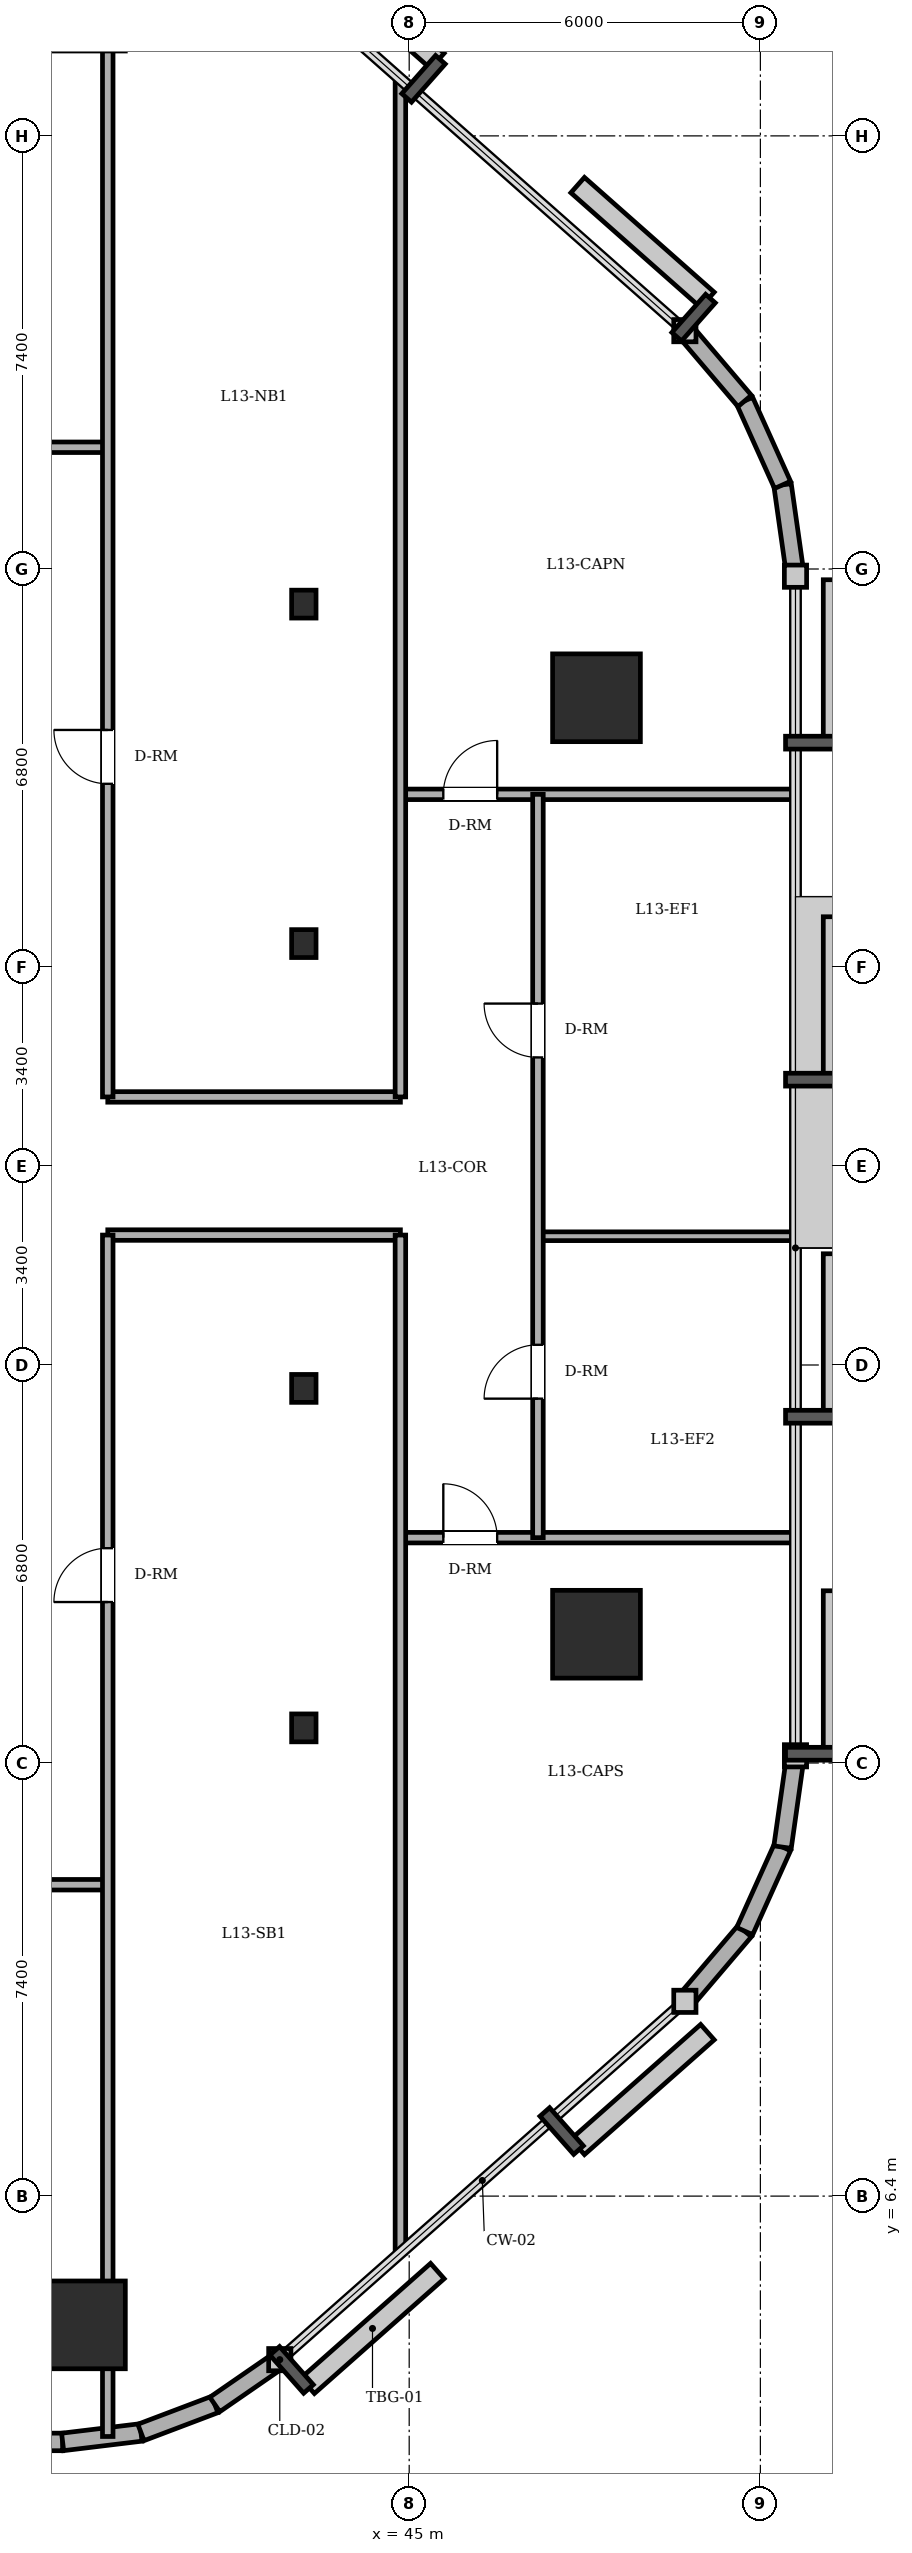
"""IFC4 building model, lengths in metres.
Left out: names, types, materials, properties, quantities, classifications, styles, units other than length and angle.
Written with IfcOpenShell. Run it as: python <this file> out.ifc"""

import sys

from ifc_helpers import new_model, si_unit, direction, frame, frame_2d, origin, origin_2d, place, context, subcontext, project, spatial, rectangle, circle, i_section, extrude, element, fill, save


model = new_model("IFC4")
c1 = context("Model", 3, precision=1e-05, world=origin(), true_north=direction((0.0, 1.0)))
c2 = subcontext(c1, "Body", "Model", "MODEL_VIEW")
j1 = project(units=[si_unit("LENGTHUNIT", "METRE"), si_unit("PLANEANGLEUNIT", "RADIAN")], contexts=[c1])
p1 = place(None, origin())
s1 = spatial("IfcSite", under=j1, at=p1, CompositionType="ELEMENT")
p2 = place(p1, origin())
s2 = spatial("IfcBuilding", under=s1, at=p2, CompositionType="ELEMENT")
p3 = place(p2, frame((0.0, 0.0, 50.4)))
s3 = spatial("IfcBuildingStorey", under=s2, at=p3, CompositionType="ELEMENT", Elevation=50.4)
for number, where, z_axis, x_axis in (
    (1, (39.4, 4.2, 0.0), (0.0, 0.0, 1.0), (1.0, 0.0, 0.0)),
    (2, (48.2, 16.0, 0.0), (0.0, 0.0, 1.0), (1.0, 0.0, 0.0)),
    (3, (48.2, 32.0, 0.0), (0.0, 0.0, 1.0), (1.0, 0.0, 0.0)),
):
    element("IfcColumn", number, at=place(p3, frame(where, z_axis=z_axis, x_axis=x_axis)), inside=s3, PredefinedType="COLUMN", context=c2, shape_type="SweptSolid", body=[
        extrude(circle(Radius=0.75, at=origin_2d()), origin(), (0.0, 0.0, 1.0), 3.6),
    ])
for number, where, z_axis, x_axis in (
    (4, (43.2, 14.4, 0.0), (0.0, 0.0, 1.0), (1.0, 0.0, 0.0)),
    (5, (43.2, 20.2, 0.0), (0.0, 0.0, 1.0), (1.0, 0.0, 0.0)),
    (6, (43.2, 27.8, 0.0), (0.0, 0.0, 1.0), (1.0, 0.0, 0.0)),
    (7, (43.2, 33.6, 0.0), (0.0, 0.0, 1.0), (1.0, 0.0, 0.0)),
):
    element("IfcColumn", number, at=place(p3, frame(where, z_axis=z_axis, x_axis=x_axis)), inside=s3, PredefinedType="COLUMN", context=c2, shape_type="SweptSolid", body=[
        extrude(i_section(OverallWidth=0.417, OverallDepth=0.477, WebThickness=0.036, FlangeThickness=0.057, FilletRadius=0.015, at=origin_2d()), origin(), (0.0, 0.0, 1.0), 3.6),
    ])
p4 = place(p3, frame((9.0, 2.2, 0.0), z_axis=(0.0, 0.0, 1.0), x_axis=(1.0, 0.0, 0.0)))
e8 = element("IfcWall", 8, at=p4, inside=s3, PredefinedType="SOLIDWALL", context=c2, shape_type="SweptSolid", body=[
    extrude(rectangle(XDim=30.079, YDim=0.3, at=frame_2d((15.04, 0.0))), origin(), (0.0, 0.0, 1.0), 3.4),
])
p5 = place(p4, frame((11.225, 0.0, 0.0)))
e9 = element("IfcOpeningElement", 9, at=p5, cuts=e8, PredefinedType="OPENING", context=c2, shape_type="SweptSolid", body=[
    extrude(rectangle(XDim=0.95, YDim=2.2, at=frame_2d((0.475, 1.1))), frame((0.0, 0.16, 0.0), z_axis=(0.0, -1.0, 0.0), x_axis=(1.0, 0.0, 0.0)), (0.0, 0.0, 1.0), 0.32),
])
p6 = place(p4, frame((4.067, 0.0, 0.85)))
e10 = element("IfcOpeningElement", 10, at=p6, cuts=e8, PredefinedType="OPENING", context=c2, shape_type="SweptSolid", body=[
    extrude(rectangle(XDim=1.8, YDim=1.55, at=frame_2d((0.9, 0.775))), frame((0.0, 0.16, 0.0), z_axis=(0.0, -1.0, 0.0), x_axis=(1.0, 0.0, 0.0)), (0.0, 0.0, 1.0), 0.32),
])
p7 = place(p4, frame((8.683, 0.0, 0.85)))
e11 = element("IfcOpeningElement", 11, at=p7, cuts=e8, PredefinedType="OPENING", context=c2, shape_type="SweptSolid", body=[
    extrude(rectangle(XDim=1.8, YDim=1.55, at=frame_2d((0.9, 0.775))), frame((0.0, 0.16, 0.0), z_axis=(0.0, -1.0, 0.0), x_axis=(1.0, 0.0, 0.0)), (0.0, 0.0, 1.0), 0.32),
])
p8 = place(p4, frame((15.2, 0.0, 0.85)))
e12 = element("IfcOpeningElement", 12, at=p8, cuts=e8, PredefinedType="OPENING", context=c2, shape_type="SweptSolid", body=[
    extrude(rectangle(XDim=1.8, YDim=1.55, at=frame_2d((0.9, 0.775))), frame((0.0, 0.16, 0.0), z_axis=(0.0, -1.0, 0.0), x_axis=(1.0, 0.0, 0.0)), (0.0, 0.0, 1.0), 0.32),
])
p9 = place(p4, frame((21.01, 0.0, 0.85)))
e13 = element("IfcOpeningElement", 13, at=p9, cuts=e8, PredefinedType="OPENING", context=c2, shape_type="SweptSolid", body=[
    extrude(rectangle(XDim=1.8, YDim=1.55, at=frame_2d((0.9, 0.775))), frame((0.0, 0.16, 0.0), z_axis=(0.0, -1.0, 0.0), x_axis=(1.0, 0.0, 0.0)), (0.0, 0.0, 1.0), 0.32),
])
p10 = place(p4, frame((24.919, 0.0, 0.85)))
e14 = element("IfcOpeningElement", 14, at=p10, cuts=e8, PredefinedType="OPENING", context=c2, shape_type="SweptSolid", body=[
    extrude(rectangle(XDim=1.8, YDim=1.55, at=frame_2d((0.9, 0.775))), frame((0.0, 0.16, 0.0), z_axis=(0.0, -1.0, 0.0), x_axis=(1.0, 0.0, 0.0)), (0.0, 0.0, 1.0), 0.32),
])
p11 = place(p3, frame((39.079, 2.2, 0.0), z_axis=(0.0, 0.0, 1.0), x_axis=(0.992739027259, 0.120288086515, 0.0)))
e15 = element("IfcWall", 15, at=p11, inside=s3, PredefinedType="SOLIDWALL", context=c2, shape_type="SweptSolid", body=[
    extrude(rectangle(XDim=1.348, YDim=0.3, at=frame_2d((0.674, 0.0))), origin(), (0.0, 0.0, 1.0), 3.4),
])
p12 = place(p3, frame((40.417, 2.362, 0.0), z_axis=(0.0, 0.0, 1.0), x_axis=(0.935156721165, 0.354234254216, 0.0)))
e16 = element("IfcWall", 16, at=p12, inside=s3, PredefinedType="SOLIDWALL", context=c2, shape_type="SweptSolid", body=[
    extrude(rectangle(XDim=1.349, YDim=0.3, at=frame_2d((0.675, 0.0))), origin(), (0.0, 0.0, 1.0), 3.4),
])
p13 = place(p3, frame((41.679, 2.84, 0.0), z_axis=(0.0, 0.0, 1.0), x_axis=(0.823116500192, 0.567872544777, 0.0)))
e17 = element("IfcWall", 17, at=p13, inside=s3, PredefinedType="SOLIDWALL", context=c2, shape_type="SweptSolid", body=[
    extrude(rectangle(XDim=1.349, YDim=0.3, at=frame_2d((0.674, 0.0))), origin(), (0.0, 0.0, 1.0), 3.4),
])
p14 = place(p3, frame((49.71, 9.728, 0.0), z_axis=(0.0, 0.0, 1.0), x_axis=(0.648389989909, 0.7613083613, 0.0)))
e18 = element("IfcWall", 18, at=p14, inside=s3, PredefinedType="SOLIDWALL", context=c2, shape_type="SweptSolid", body=[
    extrude(rectangle(XDim=1.576, YDim=0.3, at=frame_2d((0.788, 0.0))), origin(), (0.0, 0.0, 1.0), 3.4),
])
p15 = place(p3, frame((50.732, 10.928, 0.0), z_axis=(0.0, 0.0, 1.0), x_axis=(0.410996558744, 0.911636895206, 0.0)))
e19 = element("IfcWall", 19, at=p15, inside=s3, PredefinedType="SOLIDWALL", context=c2, shape_type="SweptSolid", body=[
    extrude(rectangle(XDim=1.574, YDim=0.3, at=frame_2d((0.787, 0.0))), origin(), (0.0, 0.0, 1.0), 3.4),
])
for number, where, z_axis, x_axis in (
    (20, (51.379, 12.363, 0.0), (0.0, 0.0, 1.0), (0.14, 0.99, 0.0)),
    (21, (51.6, 34.077, 0.0), (0.0, 0.0, 1.0), (-0.14, 0.99, 0.0)),
):
    element("IfcWall", number, at=place(p3, frame(where, z_axis=z_axis, x_axis=x_axis)), inside=s3, PredefinedType="SOLIDWALL", context=c2, shape_type="SweptSolid", body=[
        extrude(rectangle(XDim=1.576, YDim=0.3, at=frame_2d((0.788, 0.0))), origin(), (0.0, 0.0, 1.0), 3.4),
    ])
p16 = place(p3, frame((51.379, 35.637, 0.0), z_axis=(0.0, 0.0, 1.0), x_axis=(-0.410996558744, 0.911636895206, 0.0)))
e22 = element("IfcWall", 22, at=p16, inside=s3, PredefinedType="SOLIDWALL", context=c2, shape_type="SweptSolid", body=[
    extrude(rectangle(XDim=1.574, YDim=0.3, at=frame_2d((0.787, 0.0))), origin(), (0.0, 0.0, 1.0), 3.4),
])
p17 = place(p3, frame((50.732, 37.072, 0.0), z_axis=(0.0, 0.0, 1.0), x_axis=(-0.648389989909, 0.7613083613, 0.0)))
e23 = element("IfcWall", 23, at=p17, inside=s3, PredefinedType="SOLIDWALL", context=c2, shape_type="SweptSolid", body=[
    extrude(rectangle(XDim=1.576, YDim=0.3, at=frame_2d((0.788, 0.0))), origin(), (0.0, 0.0, 1.0), 3.4),
])
p18 = place(p3, frame((3.4, 11.72, 0.0), z_axis=(0.0, 0.0, 1.0), x_axis=(1.0, 0.0, 0.0)))
e24 = element("IfcWall", 24, at=p18, inside=s3, PredefinedType="PARTITIONING", context=c2, shape_type="SweptSolid", body=[
    extrude(rectangle(XDim=36.45, YDim=0.18, at=frame_2d((18.225, 0.0))), origin(), (0.0, 0.0, 1.0), 3.4),
])
p19 = place(p18, frame((21.24, 0.0, 0.0)))
e25 = element("IfcOpeningElement", 25, at=p19, cuts=e24, PredefinedType="OPENING", context=c2, shape_type="SweptSolid", body=[
    extrude(rectangle(XDim=0.92, YDim=2.1, at=frame_2d((0.46, 1.05))), frame((0.0, 0.1, 0.0), z_axis=(0.0, -1.0, 0.0), x_axis=(1.0, 0.0, 0.0)), (0.0, 0.0, 1.0), 0.2),
])
p20 = place(p18, frame((10.7, 0.0, 0.0)))
e26 = element("IfcOpeningElement", 26, at=p20, cuts=e24, PredefinedType="OPENING", context=c2, shape_type="SweptSolid", body=[
    extrude(rectangle(XDim=1.0, YDim=2.15, at=frame_2d((0.5, 1.075))), frame((0.0, 0.1, 0.0), z_axis=(0.0, -1.0, 0.0), x_axis=(1.0, 0.0, 0.0)), (0.0, 0.0, 1.0), 0.2),
])
p21 = place(p18, frame((29.305, 0.0, 0.0)))
e27 = element("IfcOpeningElement", 27, at=p21, cuts=e24, PredefinedType="OPENING", context=c2, shape_type="SweptSolid", body=[
    extrude(rectangle(XDim=0.92, YDim=2.1, at=frame_2d((0.46, 1.05))), frame((0.0, 0.1, 0.0), z_axis=(0.0, -1.0, 0.0), x_axis=(1.0, 0.0, 0.0)), (0.0, 0.0, 1.0), 0.2),
])
p22 = place(p3, frame((44.85, 17.65, 0.0), z_axis=(0.0, 0.0, 1.0), x_axis=(1.0, 0.0, 0.0)))
e28 = element("IfcWall", 28, at=p22, inside=s3, PredefinedType="PARTITIONING", context=c2, shape_type="SweptSolid", body=[
    extrude(rectangle(XDim=6.75, YDim=0.18, at=frame_2d((3.375, 0.0))), origin(), (0.0, 0.0, 1.0), 3.4),
])
p23 = place(p22, frame((0.733, 0.0, 0.0)))
e29 = element("IfcOpeningElement", 29, at=p23, cuts=e28, PredefinedType="OPENING", context=c2, shape_type="SweptSolid", body=[
    extrude(rectangle(XDim=0.92, YDim=2.1, at=frame_2d((0.46, 1.05))), frame((0.0, 0.1, 0.0), z_axis=(0.0, -1.0, 0.0), x_axis=(1.0, 0.0, 0.0)), (0.0, 0.0, 1.0), 0.2),
])
p24 = place(p3, frame((39.85, 22.82, 0.0), z_axis=(0.0, 0.0, 1.0), x_axis=(1.0, 0.0, 0.0)))
e30 = element("IfcWall", 30, at=p24, inside=s3, PredefinedType="PARTITIONING", context=c2, shape_type="SweptSolid", body=[
    extrude(rectangle(XDim=5.0, YDim=0.18, at=frame_2d((2.5, 0.0))), origin(), (0.0, 0.0, 1.0), 3.4),
])
p25 = place(p3, frame((47.2, 22.8, 0.0), z_axis=(0.0, 0.0, 1.0), x_axis=(1.0, 0.0, 0.0)))
e31 = element("IfcWall", 31, at=p25, inside=s3, PredefinedType="PARTITIONING", context=c2, shape_type="SweptSolid", body=[
    extrude(rectangle(XDim=4.4, YDim=0.15, at=frame_2d((2.2, 0.0))), origin(), (0.0, 0.0, 1.0), 3.4),
])
p26 = place(p3, frame((39.85, 25.18, 0.0), z_axis=(0.0, 0.0, 1.0), x_axis=(1.0, 0.0, 0.0)))
e32 = element("IfcWall", 32, at=p26, inside=s3, PredefinedType="PARTITIONING", context=c2, shape_type="SweptSolid", body=[
    extrude(rectangle(XDim=5.0, YDim=0.18, at=frame_2d((2.5, 0.0))), origin(), (0.0, 0.0, 1.0), 3.4),
])
p27 = place(p3, frame((44.85, 30.35, 0.0), z_axis=(0.0, 0.0, 1.0), x_axis=(1.0, 0.0, 0.0)))
e33 = element("IfcWall", 33, at=p27, inside=s3, PredefinedType="PARTITIONING", context=c2, shape_type="SweptSolid", body=[
    extrude(rectangle(XDim=6.75, YDim=0.18, at=frame_2d((3.375, 0.0))), origin(), (0.0, 0.0, 1.0), 3.4),
])
p28 = place(p27, frame((0.733, 0.0, 0.0)))
e34 = element("IfcOpeningElement", 34, at=p28, cuts=e33, PredefinedType="OPENING", context=c2, shape_type="SweptSolid", body=[
    extrude(rectangle(XDim=0.92, YDim=2.1, at=frame_2d((0.46, 1.05))), frame((0.0, 0.1, 0.0), z_axis=(0.0, -1.0, 0.0), x_axis=(1.0, 0.0, 0.0)), (0.0, 0.0, 1.0), 0.2),
])
p29 = place(p3, frame((3.4, 36.28, 0.0), z_axis=(0.0, 0.0, 1.0), x_axis=(1.0, 0.0, 0.0)))
e35 = element("IfcWall", 35, at=p29, inside=s3, PredefinedType="PARTITIONING", context=c2, shape_type="SweptSolid", body=[
    extrude(rectangle(XDim=36.45, YDim=0.18, at=frame_2d((18.225, 0.0))), origin(), (0.0, 0.0, 1.0), 3.4),
])
p30 = place(p29, frame((21.05, 0.0, 0.0)))
e36 = element("IfcOpeningElement", 36, at=p30, cuts=e35, PredefinedType="OPENING", context=c2, shape_type="SweptSolid", body=[
    extrude(rectangle(XDim=0.9, YDim=2.1, at=frame_2d((0.45, 1.05))), frame((0.0, 0.1, 0.0), z_axis=(0.0, -1.0, 0.0), x_axis=(1.0, 0.0, 0.0)), (0.0, 0.0, 1.0), 0.2),
])
p31 = place(p29, frame((24.67, 0.0, 0.0)))
e37 = element("IfcOpeningElement", 37, at=p31, cuts=e35, PredefinedType="OPENING", context=c2, shape_type="SweptSolid", body=[
    extrude(rectangle(XDim=0.86, YDim=2.1, at=frame_2d((0.43, 1.05))), frame((0.0, 0.1, 0.0), z_axis=(0.0, -1.0, 0.0), x_axis=(1.0, 0.0, 0.0)), (0.0, 0.0, 1.0), 0.2),
])
p32 = place(p29, frame((10.7, 0.0, 0.0)))
e38 = element("IfcOpeningElement", 38, at=p32, cuts=e35, PredefinedType="OPENING", context=c2, shape_type="SweptSolid", body=[
    extrude(rectangle(XDim=1.0, YDim=2.15, at=frame_2d((0.5, 1.075))), frame((0.0, 0.1, 0.0), z_axis=(0.0, -1.0, 0.0), x_axis=(1.0, 0.0, 0.0)), (0.0, 0.0, 1.0), 0.2),
])
p33 = place(p29, frame((30.965, 0.0, 0.0)))
e39 = element("IfcOpeningElement", 39, at=p33, cuts=e35, PredefinedType="OPENING", context=c2, shape_type="SweptSolid", body=[
    extrude(rectangle(XDim=1.0, YDim=2.15, at=frame_2d((0.5, 1.075))), frame((0.0, 0.1, 0.0), z_axis=(0.0, -1.0, 0.0), x_axis=(1.0, 0.0, 0.0)), (0.0, 0.0, 1.0), 0.2),
])
p34 = place(p3, frame((39.85, 2.293, 0.0), z_axis=(0.0, 0.0, 1.0), x_axis=(0.0, 1.0, 0.0)))
e40 = element("IfcWall", 40, at=p34, inside=s3, PredefinedType="PARTITIONING", context=c2, shape_type="SweptSolid", body=[
    extrude(rectangle(XDim=20.527, YDim=0.18, at=frame_2d((10.264, 0.0))), origin(), (0.0, 0.0, 1.0), 2.782),
])
p35 = place(p34, frame((14.257, 0.0, 0.0)))
e41 = element("IfcOpeningElement", 41, at=p35, cuts=e40, PredefinedType="OPENING", context=c2, shape_type="SweptSolid", body=[
    extrude(rectangle(XDim=0.92, YDim=2.1, at=frame_2d((0.46, 1.05))), frame((0.0, 0.1, 0.0), z_axis=(0.0, -1.0, 0.0), x_axis=(1.0, 0.0, 0.0)), (0.0, 0.0, 1.0), 0.2),
])
p36 = place(p3, frame((39.85, 25.18, 0.0), z_axis=(0.0, 0.0, 1.0), x_axis=(0.0, 1.0, 0.0)))
e42 = element("IfcWall", 42, at=p36, inside=s3, PredefinedType="PARTITIONING", context=c2, shape_type="SweptSolid", body=[
    extrude(rectangle(XDim=20.527, YDim=0.18, at=frame_2d((10.264, 0.0))), origin(), (0.0, 0.0, 1.0), 2.782),
])
p37 = place(p36, frame((5.35, 0.0, 0.0)))
e43 = element("IfcOpeningElement", 43, at=p37, cuts=e42, PredefinedType="OPENING", context=c2, shape_type="SweptSolid", body=[
    extrude(rectangle(XDim=0.92, YDim=2.1, at=frame_2d((0.46, 1.05))), frame((0.0, 0.1, 0.0), z_axis=(0.0, -1.0, 0.0), x_axis=(1.0, 0.0, 0.0)), (0.0, 0.0, 1.0), 0.2),
])
for number, where, z_axis, x_axis in (
    (44, (44.85, 5.429, 0.0), (0.0, 0.0, 1.0), (0.0, 1.0, 0.0)),
    (45, (44.85, 25.18, 0.0), (0.0, 0.0, 1.0), (0.0, 1.0, 0.0)),
):
    element("IfcWall", number, at=place(p3, frame(where, z_axis=z_axis, x_axis=x_axis)), inside=s3, PredefinedType="PARTITIONING", context=c2, shape_type="SweptSolid", body=[
        extrude(rectangle(XDim=17.391, YDim=0.18, at=frame_2d((8.696, 0.0))), origin(), (0.0, 0.0, 1.0), 3.4),
    ])
p38 = place(p3, frame((47.2, 17.65, 0.0), z_axis=(0.0, 0.0, 1.0), x_axis=(0.0, 1.0, 0.0)))
e46 = element("IfcWall", 46, at=p38, inside=s3, PredefinedType="PARTITIONING", context=c2, shape_type="SweptSolid", body=[
    extrude(rectangle(XDim=12.7, YDim=0.18, at=frame_2d((6.35, 0.0))), origin(), (0.0, 0.0, 1.0), 3.4),
])
p39 = place(p38, frame((8.205, 0.0, 0.0)))
e47 = element("IfcOpeningElement", 47, at=p39, cuts=e46, PredefinedType="OPENING", context=c2, shape_type="SweptSolid", body=[
    extrude(rectangle(XDim=0.92, YDim=2.1, at=frame_2d((0.46, 1.05))), frame((0.0, 0.1, 0.0), z_axis=(0.0, -1.0, 0.0), x_axis=(1.0, 0.0, 0.0)), (0.0, 0.0, 1.0), 0.2),
])
p40 = place(p38, frame((2.375, 0.0, 0.0)))
e48 = element("IfcOpeningElement", 48, at=p40, cuts=e46, PredefinedType="OPENING", context=c2, shape_type="SweptSolid", body=[
    extrude(rectangle(XDim=0.92, YDim=2.1, at=frame_2d((0.46, 1.05))), frame((0.0, 0.1, 0.0), z_axis=(0.0, -1.0, 0.0), x_axis=(1.0, 0.0, 0.0)), (0.0, 0.0, 1.0), 0.2),
])
p41 = place(p37, origin())
e49 = element("IfcDoor", 49, at=p41, inside=s3, OperationType="SINGLE_SWING_RIGHT", PredefinedType="DOOR", context=c2, shape_type="SweptSolid", body=[
    extrude(rectangle(XDim=0.92, YDim=2.1, at=frame_2d((0.46, 1.05))), frame((0.0, 0.025, 0.0), z_axis=(0.0, -1.0, 0.0), x_axis=(1.0, 0.0, 0.0)), (0.0, 0.0, 1.0), 0.05),
])
fill(e43, e49)
p42 = place(p35, origin())
e50 = element("IfcDoor", 50, at=p42, inside=s3, OperationType="SINGLE_SWING_LEFT", PredefinedType="DOOR", context=c2, shape_type="SweptSolid", body=[
    extrude(rectangle(XDim=0.92, YDim=2.1, at=frame_2d((0.46, 1.05))), frame((0.0, 0.025, 0.0), z_axis=(0.0, -1.0, 0.0), x_axis=(1.0, 0.0, 0.0)), (0.0, 0.0, 1.0), 0.05),
])
fill(e41, e50)
p43 = place(p28, origin())
e51 = element("IfcDoor", 51, at=p43, inside=s3, OperationType="SINGLE_SWING_RIGHT", PredefinedType="DOOR", context=c2, shape_type="SweptSolid", body=[
    extrude(rectangle(XDim=0.92, YDim=2.1, at=frame_2d((0.46, 1.05))), frame((0.0, 0.025, 0.0), z_axis=(0.0, -1.0, 0.0), x_axis=(1.0, 0.0, 0.0)), (0.0, 0.0, 1.0), 0.05),
])
fill(e34, e51)
p44 = place(p23, origin())
e52 = element("IfcDoor", 52, at=p44, inside=s3, OperationType="SINGLE_SWING_LEFT", PredefinedType="DOOR", context=c2, shape_type="SweptSolid", body=[
    extrude(rectangle(XDim=0.92, YDim=2.1, at=frame_2d((0.46, 1.05))), frame((0.0, 0.025, 0.0), z_axis=(0.0, -1.0, 0.0), x_axis=(1.0, 0.0, 0.0)), (0.0, 0.0, 1.0), 0.05),
])
fill(e29, e52)
p45 = place(p39, origin())
e53 = element("IfcDoor", 53, at=p45, inside=s3, OperationType="SINGLE_SWING_RIGHT", PredefinedType="DOOR", context=c2, shape_type="SweptSolid", body=[
    extrude(rectangle(XDim=0.92, YDim=2.1, at=frame_2d((0.46, 1.05))), frame((0.0, 0.025, 0.0), z_axis=(0.0, -1.0, 0.0), x_axis=(1.0, 0.0, 0.0)), (0.0, 0.0, 1.0), 0.05),
])
fill(e47, e53)
p46 = place(p40, origin())
e54 = element("IfcDoor", 54, at=p46, inside=s3, OperationType="SINGLE_SWING_LEFT", PredefinedType="DOOR", context=c2, shape_type="SweptSolid", body=[
    extrude(rectangle(XDim=0.92, YDim=2.1, at=frame_2d((0.46, 1.05))), frame((0.0, 0.025, 0.0), z_axis=(0.0, -1.0, 0.0), x_axis=(1.0, 0.0, 0.0)), (0.0, 0.0, 1.0), 0.05),
])
fill(e48, e54)
save(model, sys.argv[1])
